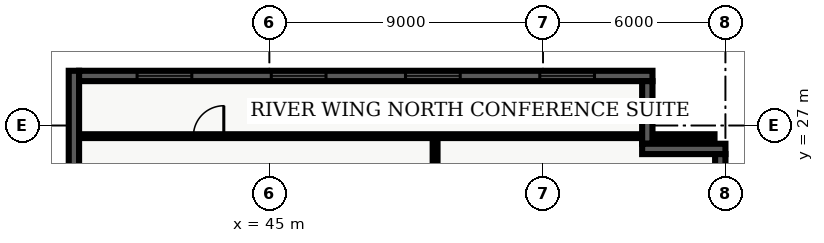
"""IFC4 building model, lengths in metres.
Left out: names, types, materials, properties, quantities, classifications, styles, units other than length and angle.
Written with IfcOpenShell. Run it as: python <this file> out.ifc"""

import sys

from ifc_helpers import new_model, entity, si_unit, converted_unit, direction, frame, origin_with_axes, origin_2d_with_axis, place, context, subcontext, project, spatial, polyline, rectangle, outline, extrude, element, fill, save


model = new_model("IFC4")
c1 = context("Model", 3, precision=1e-05, world=origin_with_axes(), true_north=direction((0.0, 1.0)))
c2 = subcontext(c1, "Body", "Model", "MODEL_VIEW")
j1 = project(units=[si_unit("LENGTHUNIT", "METRE"), converted_unit("PLANEANGLEUNIT", "DEGREE", entity("IfcPlaneAngleMeasure", 0.017), si_unit("PLANEANGLEUNIT", "RADIAN"), dimensions=[0, 0, 0, 0, 0, 0, 0])], contexts=[c1])
p1 = place(None, origin_with_axes())
s1 = spatial("IfcSite", under=j1, at=p1, CompositionType="ELEMENT")
p2 = place(p1, origin_with_axes())
s2 = spatial("IfcBuilding", under=s1, at=p2, CompositionType="ELEMENT")
p3 = place(p2, frame((0.0, 0.0, 208.2), z_axis=(0.0, 0.0, 1.0), x_axis=(1.0, 0.0, 0.0)))
s3 = spatial("IfcBuildingStorey", under=s2, at=p3, CompositionType="ELEMENT", Elevation=208.2)
p4 = place(p3, frame((50.45, 7.85, 0.0), z_axis=(0.0, 0.0, 1.0), x_axis=(0.0, 1.0, 0.0)))
e1 = element("IfcWall", 1, at=p4, inside=s3, PredefinedType="PARTITIONING", context=c2, shape_type="SweptSolid", body=[
    extrude(outline(polyline([(0.0, -0.08), (18.8, -0.08), (18.8, 0.08), (0.0, 0.08), (0.0, -0.08)])), origin_with_axes(), (0.0, 0.0, 1.0), 2.7),
])
p5 = place(p4, frame((5.852, 0.0, 0.0), z_axis=(0.0, 0.0, 1.0), x_axis=(1.0, 0.0, 0.0)))
e2 = element("IfcOpeningElement", 2, at=p5, cuts=e1, PredefinedType="OPENING", context=c2, shape_type="SweptSolid", body=[
    extrude(rectangle(XDim=1.0, YDim=0.18, at=origin_2d_with_axis()), origin_with_axes(), (0.0, 0.0, 1.0), 2.15),
])
p6 = place(p4, frame((11.249, 0.0, 0.0), z_axis=(0.0, 0.0, 1.0), x_axis=(1.0, 0.0, 0.0)))
e3 = element("IfcOpeningElement", 3, at=p6, cuts=e1, PredefinedType="OPENING", context=c2, shape_type="SweptSolid", body=[
    extrude(rectangle(XDim=1.0, YDim=0.18, at=origin_2d_with_axis()), origin_with_axes(), (0.0, 0.0, 1.0), 2.15),
])
p7 = place(p4, frame((14.113, 0.0, 0.0), z_axis=(0.0, 0.0, 1.0), x_axis=(1.0, 0.0, 0.0)))
e4 = element("IfcOpeningElement", 4, at=p7, cuts=e1, PredefinedType="OPENING", context=c2, shape_type="SweptSolid", body=[
    extrude(rectangle(XDim=1.0, YDim=0.18, at=origin_2d_with_axis()), origin_with_axes(), (0.0, 0.0, 1.0), 2.15),
])
p8 = place(p3, frame((38.735, 26.65, 0.0), z_axis=(0.0, 0.0, 1.0), x_axis=(1.0, 0.0, 0.0)))
e5 = element("IfcWall", 5, at=p8, inside=s3, PredefinedType="PARTITIONING", context=c2, shape_type="SweptSolid", body=[
    extrude(outline(polyline([(0.0, -0.062), (20.905, -0.062), (20.905, 0.062), (0.0, 0.062), (0.0, -0.062)])), origin_with_axes(), (0.0, 0.0, 1.0), 2.7),
])
p9 = place(p8, frame((4.265, 0.0, 0.0), z_axis=(0.0, 0.0, 1.0), x_axis=(1.0, 0.0, 0.0)))
e6 = element("IfcOpeningElement", 6, at=p9, cuts=e5, PredefinedType="OPENING", context=c2, shape_type="SweptSolid", body=[
    extrude(rectangle(XDim=1.0, YDim=0.145, at=origin_2d_with_axis()), origin_with_axes(), (0.0, 0.0, 1.0), 2.15),
])
p10 = place(p3, frame((38.57, 21.26, 0.0), z_axis=(0.0, 0.0, 1.0), x_axis=(0.0, 1.0, 0.0)))
e7 = element("IfcWall", 7, at=p10, inside=s3, PredefinedType="SOLIDWALL", context=c2, shape_type="SweptSolid", body=[
    extrude(outline(polyline([(0.0, -0.17), (7.54, -0.17), (7.54, 0.17), (0.0, 0.17), (0.0, -0.17)])), origin_with_axes(), (0.0, 0.0, 1.0), 3.66),
])
p11 = place(p3, frame((38.74, 28.63, 0.0), z_axis=(0.0, 0.0, 1.0), x_axis=(1.0, 0.0, 0.0)))
e8 = element("IfcWall", 8, at=p11, inside=s3, PredefinedType="SOLIDWALL", context=c2, shape_type="SweptSolid", body=[
    extrude(outline(polyline([(0.0, -0.17), (18.86, -0.17), (18.86, 0.17), (0.0, 0.17), (0.0, -0.17)])), origin_with_axes(), (0.0, 0.0, 1.0), 3.66),
])
p12 = place(p11, frame((2.808, 0.0, 0.45), z_axis=(0.0, 0.0, 1.0), x_axis=(1.0, 0.0, 0.0)))
e9 = element("IfcOpeningElement", 9, at=p12, cuts=e8, PredefinedType="OPENING", context=c2, shape_type="SweptSolid", body=[
    extrude(rectangle(XDim=1.8, YDim=0.36, at=origin_2d_with_axis()), origin_with_axes(), (0.0, 0.0, 1.0), 2.1),
])
p13 = place(p11, frame((7.222, 0.0, 0.45), z_axis=(0.0, 0.0, 1.0), x_axis=(1.0, 0.0, 0.0)))
e10 = element("IfcOpeningElement", 10, at=p13, cuts=e8, PredefinedType="OPENING", context=c2, shape_type="SweptSolid", body=[
    extrude(rectangle(XDim=1.8, YDim=0.36, at=origin_2d_with_axis()), origin_with_axes(), (0.0, 0.0, 1.0), 2.1),
])
p14 = place(p11, frame((11.637, 0.0, 0.45), z_axis=(0.0, 0.0, 1.0), x_axis=(1.0, 0.0, 0.0)))
e11 = element("IfcOpeningElement", 11, at=p14, cuts=e8, PredefinedType="OPENING", context=c2, shape_type="SweptSolid", body=[
    extrude(rectangle(XDim=1.8, YDim=0.36, at=origin_2d_with_axis()), origin_with_axes(), (0.0, 0.0, 1.0), 2.1),
])
p15 = place(p11, frame((16.053, 0.0, 0.45), z_axis=(0.0, 0.0, 1.0), x_axis=(1.0, 0.0, 0.0)))
e12 = element("IfcOpeningElement", 12, at=p15, cuts=e8, PredefinedType="OPENING", context=c2, shape_type="SweptSolid", body=[
    extrude(rectangle(XDim=1.8, YDim=0.36, at=origin_2d_with_axis()), origin_with_axes(), (0.0, 0.0, 1.0), 2.1),
])
p16 = place(p3, frame((57.43, 28.46, 0.0), z_axis=(0.0, 0.0, 1.0), x_axis=(0.0, -1.0, 0.0)))
e13 = element("IfcWall", 13, at=p16, inside=s3, PredefinedType="SOLIDWALL", context=c2, shape_type="SweptSolid", body=[
    extrude(outline(polyline([(0.0, -0.17), (2.06, -0.17), (2.06, 0.17), (0.0, 0.17), (0.0, -0.17)])), origin_with_axes(), (0.0, 0.0, 1.0), 3.66),
])
p17 = place(p3, frame((57.26, 26.23, 0.0), z_axis=(0.0, 0.0, 1.0), x_axis=(1.0, 0.0, 0.0)))
e14 = element("IfcWall", 14, at=p17, inside=s3, PredefinedType="SOLIDWALL", context=c2, shape_type="SweptSolid", body=[
    extrude(outline(polyline([(0.0, -0.17), (2.74, -0.17), (2.74, 0.17), (0.0, 0.17), (0.0, -0.17)])), origin_with_axes(), (0.0, 0.0, 1.0), 3.66),
])
p18 = place(p3, frame((59.83, 26.06, 0.0), z_axis=(0.0, 0.0, 1.0), x_axis=(0.0, -1.0, 0.0)))
e15 = element("IfcWall", 15, at=p18, inside=s3, PredefinedType="SOLIDWALL", context=c2, shape_type="SweptSolid", body=[
    extrude(outline(polyline([(0.0, -0.17), (23.66, -0.17), (23.66, 0.17), (0.0, 0.17), (0.0, -0.17)])), origin_with_axes(), (0.0, 0.0, 1.0), 3.66),
])
p19 = place(p18, frame((3.696, 0.0, 0.45), z_axis=(0.0, 0.0, 1.0), x_axis=(1.0, 0.0, 0.0)))
e16 = element("IfcOpeningElement", 16, at=p19, cuts=e15, PredefinedType="OPENING", context=c2, shape_type="SweptSolid", body=[
    extrude(rectangle(XDim=1.8, YDim=0.36, at=origin_2d_with_axis()), origin_with_axes(), (0.0, 0.0, 1.0), 2.1),
])
p20 = place(p18, frame((11.83, 0.0, 0.45), z_axis=(0.0, 0.0, 1.0), x_axis=(1.0, 0.0, 0.0)))
e17 = element("IfcOpeningElement", 17, at=p20, cuts=e15, PredefinedType="OPENING", context=c2, shape_type="SweptSolid", body=[
    extrude(rectangle(XDim=1.8, YDim=0.36, at=origin_2d_with_axis()), origin_with_axes(), (0.0, 0.0, 1.0), 2.1),
])
p21 = place(p18, frame((20.364, 0.0, 0.45), z_axis=(0.0, 0.0, 1.0), x_axis=(1.0, 0.0, 0.0)))
e18 = element("IfcOpeningElement", 18, at=p21, cuts=e15, PredefinedType="OPENING", context=c2, shape_type="SweptSolid", body=[
    extrude(rectangle(XDim=1.8, YDim=0.36, at=origin_2d_with_axis()), origin_with_axes(), (0.0, 0.0, 1.0), 2.1),
])
p22 = place(p8, frame((4.265, 0.0, 0.0), z_axis=(0.0, 0.0, 1.0), x_axis=(1.0, 0.0, 0.0)))
e19 = element("IfcDoor", 19, at=p22, inside=s3, OperationType="SINGLE_SWING_RIGHT", PredefinedType="DOOR", context=c2, shape_type="SweptSolid", body=[
    extrude(rectangle(XDim=1.0, YDim=0.075, at=origin_2d_with_axis()), origin_with_axes(), (0.0, 0.0, 1.0), 2.15),
])
fill(e6, e19)
p23 = place(p11, frame((2.808, 0.0, 0.45), z_axis=(0.0, 0.0, 1.0), x_axis=(1.0, 0.0, 0.0)))
e20 = element("IfcWindow", 20, at=p23, inside=s3, PredefinedType="WINDOW", context=c2, shape_type="SweptSolid", body=[
    extrude(rectangle(XDim=1.8, YDim=0.09, at=origin_2d_with_axis()), origin_with_axes(), (0.0, 0.0, 1.0), 2.1),
])
fill(e9, e20)
p24 = place(p11, frame((7.222, 0.0, 0.45), z_axis=(0.0, 0.0, 1.0), x_axis=(1.0, 0.0, 0.0)))
e21 = element("IfcWindow", 21, at=p24, inside=s3, PredefinedType="WINDOW", context=c2, shape_type="SweptSolid", body=[
    extrude(rectangle(XDim=1.8, YDim=0.09, at=origin_2d_with_axis()), origin_with_axes(), (0.0, 0.0, 1.0), 2.1),
])
fill(e10, e21)
p25 = place(p11, frame((11.637, 0.0, 0.45), z_axis=(0.0, 0.0, 1.0), x_axis=(1.0, 0.0, 0.0)))
e22 = element("IfcWindow", 22, at=p25, inside=s3, PredefinedType="WINDOW", context=c2, shape_type="SweptSolid", body=[
    extrude(rectangle(XDim=1.8, YDim=0.09, at=origin_2d_with_axis()), origin_with_axes(), (0.0, 0.0, 1.0), 2.1),
])
fill(e11, e22)
p26 = place(p11, frame((16.053, 0.0, 0.45), z_axis=(0.0, 0.0, 1.0), x_axis=(1.0, 0.0, 0.0)))
e23 = element("IfcWindow", 23, at=p26, inside=s3, PredefinedType="WINDOW", context=c2, shape_type="SweptSolid", body=[
    extrude(rectangle(XDim=1.8, YDim=0.09, at=origin_2d_with_axis()), origin_with_axes(), (0.0, 0.0, 1.0), 2.1),
])
fill(e12, e23)
save(model, sys.argv[1])
